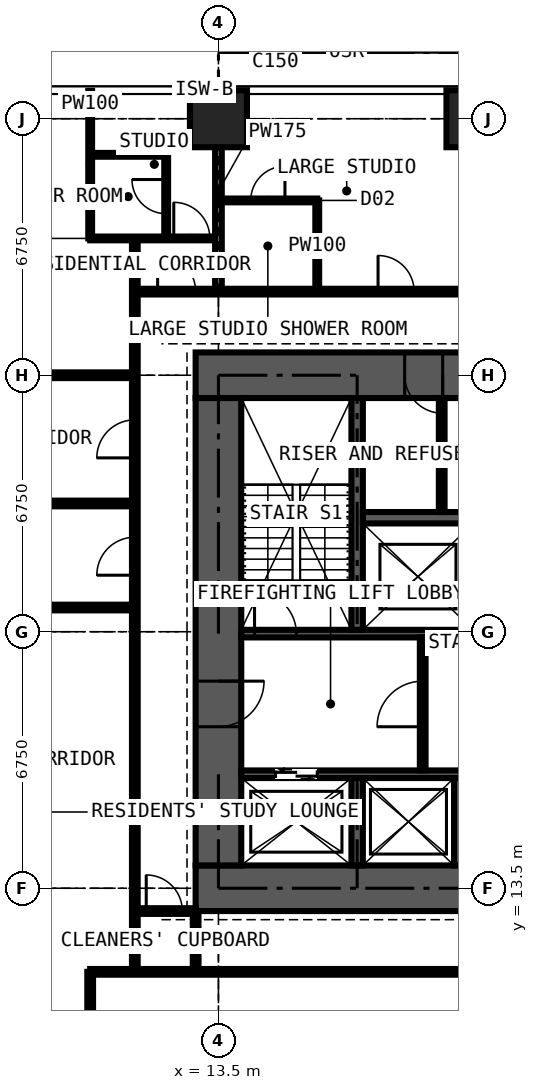
"""IFC4 building model, lengths in metres.
Left out: names, types, materials, properties, quantities, classifications, styles, units other than length and angle.
Written with IfcOpenShell. Run it as: python <this file> out.ifc"""

import sys

from ifc_helpers import new_model, si_unit, direction, frame, frame_2d, origin, origin_2d, place, context, subcontext, project, spatial, rectangle, extrude, element, fill, save


model = new_model("IFC4")
c1 = context("Model", 3, precision=1e-05, world=origin(), true_north=direction((0.0, 1.0)))
c2 = subcontext(c1, "Body", "Model", "MODEL_VIEW")
j1 = project(units=[si_unit("LENGTHUNIT", "METRE"), si_unit("PLANEANGLEUNIT", "RADIAN")], contexts=[c1])
p1 = place(None, origin())
s1 = spatial("IfcSite", under=j1, at=p1, CompositionType="ELEMENT")
p2 = place(p1, origin())
s2 = spatial("IfcBuilding", under=s1, at=p2, CompositionType="ELEMENT")
p3 = place(p2, frame((0.0, 0.0, 126.9)))
s3 = spatial("IfcBuildingStorey", under=s2, at=p3, CompositionType="ELEMENT", Elevation=126.9)
for number, where, z_axis, x_axis in (
    (1, (13.5, 33.75, 0.0), (0.0, 0.0, 1.0), (1.0, 0.0, 0.0)),
    (2, (20.25, 33.75, 0.0), (0.0, 0.0, 1.0), (1.0, 0.0, 0.0)),
):
    element("IfcColumn", number, at=place(p3, frame(where, z_axis=z_axis, x_axis=x_axis)), inside=s3, PredefinedType="COLUMN", context=c2, shape_type="SweptSolid", body=[
        extrude(rectangle(XDim=1.5, YDim=1.5, at=origin_2d()), origin(), (0.0, 0.0, 1.0), 3.6),
    ])
p4 = place(p3, frame((12.9, 13.5, 0.0), z_axis=(0.0, 0.0, 1.0), x_axis=(1.0, 0.0, 0.0)))
e3 = element("IfcWall", 3, at=p4, inside=s3, PredefinedType="SHEAR", context=c2, shape_type="SweptSolid", body=[
    extrude(rectangle(XDim=14.7, YDim=1.2, at=frame_2d((7.35, 0.0))), origin(), (0.0, 0.0, 1.0), 3.6),
])
p5 = place(p3, frame((27.6, 27.0, 0.0), z_axis=(0.0, 0.0, 1.0), x_axis=(-1.0, 0.0, 0.0)))
e4 = element("IfcWall", 4, at=p5, inside=s3, PredefinedType="SHEAR", context=c2, shape_type="SweptSolid", body=[
    extrude(rectangle(XDim=14.7, YDim=1.2, at=frame_2d((7.35, 0.0))), origin(), (0.0, 0.0, 1.0), 3.6),
])
p6 = place(p5, frame((5.225, 0.0, 0.0)))
e5 = element("IfcOpeningElement", 5, at=p6, cuts=e4, PredefinedType="OPENING", context=c2, shape_type="SweptSolid", body=[
    extrude(rectangle(XDim=0.9, YDim=2.2, at=frame_2d((0.45, 1.1))), frame((0.0, 0.61, 0.0), z_axis=(0.0, -1.0, 0.0), x_axis=(1.0, 0.0, 0.0)), (0.0, 0.0, 1.0), 1.22),
])
p7 = place(p5, frame((8.2, 0.0, 0.0)))
e6 = element("IfcOpeningElement", 6, at=p7, cuts=e4, PredefinedType="OPENING", context=c2, shape_type="SweptSolid", body=[
    extrude(rectangle(XDim=1.0, YDim=2.2, at=frame_2d((0.5, 1.1))), frame((0.0, 0.61, 0.0), z_axis=(0.0, -1.0, 0.0), x_axis=(1.0, 0.0, 0.0)), (0.0, 0.0, 1.0), 1.22),
])
p8 = place(p3, frame((13.5, 26.4, 0.0), z_axis=(0.0, 0.0, 1.0), x_axis=(0.0, -1.0, 0.0)))
e7 = element("IfcWall", 7, at=p8, inside=s3, PredefinedType="SHEAR", context=c2, shape_type="SweptSolid", body=[
    extrude(rectangle(XDim=12.3, YDim=1.2, at=frame_2d((6.15, 0.0))), origin(), (0.0, 0.0, 1.0), 3.6),
])
p9 = place(p8, frame((7.45, 0.0, 0.0)))
e8 = element("IfcOpeningElement", 8, at=p9, cuts=e7, PredefinedType="OPENING", context=c2, shape_type="SweptSolid", body=[
    extrude(rectangle(XDim=1.2, YDim=2.2, at=frame_2d((0.6, 1.1))), frame((0.0, 0.61, 0.0), z_axis=(0.0, -1.0, 0.0), x_axis=(1.0, 0.0, 0.0)), (0.0, 0.0, 1.0), 1.22),
])
p10 = place(p3, frame((14.1, 16.5, 0.0), z_axis=(0.0, 0.0, 1.0), x_axis=(1.0, 0.0, 0.0)))
e9 = element("IfcWall", 9, at=p10, inside=s3, PredefinedType="SHEAR", context=c2, shape_type="SweptSolid", body=[
    extrude(rectangle(XDim=12.3, YDim=0.2, at=frame_2d((6.15, 0.0))), origin(), (0.0, 0.0, 1.0), 3.6),
])
p11 = place(p10, frame((0.9, 0.0, 0.0)))
e10 = element("IfcOpeningElement", 10, at=p11, cuts=e9, PredefinedType="OPENING", context=c2, shape_type="SweptSolid", body=[
    extrude(rectangle(XDim=1.1, YDim=2.2, at=frame_2d((0.55, 1.1))), frame((0.0, 0.11, 0.0), z_axis=(0.0, -1.0, 0.0), x_axis=(1.0, 0.0, 0.0)), (0.0, 0.0, 1.0), 0.22),
])
p12 = place(p10, frame((9.5, 0.0, 0.0)))
e11 = element("IfcOpeningElement", 11, at=p12, cuts=e9, PredefinedType="OPENING", context=c2, shape_type="SweptSolid", body=[
    extrude(rectangle(XDim=1.1, YDim=2.2, at=frame_2d((0.55, 1.1))), frame((0.0, 0.11, 0.0), z_axis=(0.0, -1.0, 0.0), x_axis=(1.0, 0.0, 0.0)), (0.0, 0.0, 1.0), 0.22),
])
p13 = place(p3, frame((14.1, 20.2, 0.0), z_axis=(0.0, 0.0, 1.0), x_axis=(1.0, 0.0, 0.0)))
e12 = element("IfcWall", 12, at=p13, inside=s3, PredefinedType="SHEAR", context=c2, shape_type="SweptSolid", body=[
    extrude(rectangle(XDim=12.3, YDim=0.2, at=frame_2d((6.15, 0.0))), origin(), (0.0, 0.0, 1.0), 3.6),
])
p14 = place(p13, frame((0.35, 0.0, 0.0)))
e13 = element("IfcOpeningElement", 13, at=p14, cuts=e12, PredefinedType="OPENING", context=c2, shape_type="SweptSolid", body=[
    extrude(rectangle(XDim=1.1, YDim=2.2, at=frame_2d((0.55, 1.1))), frame((0.0, 0.11, 0.0), z_axis=(0.0, -1.0, 0.0), x_axis=(1.0, 0.0, 0.0)), (0.0, 0.0, 1.0), 0.22),
])
p15 = place(p13, frame((9.75, 0.0, 0.0)))
e14 = element("IfcOpeningElement", 14, at=p15, cuts=e12, PredefinedType="OPENING", context=c2, shape_type="SweptSolid", body=[
    extrude(rectangle(XDim=1.1, YDim=2.2, at=frame_2d((0.55, 1.1))), frame((0.0, 0.11, 0.0), z_axis=(0.0, -1.0, 0.0), x_axis=(1.0, 0.0, 0.0)), (0.0, 0.0, 1.0), 0.22),
])
p16 = place(p3, frame((17.15, 20.3, 0.0), z_axis=(0.0, 0.0, 1.0), x_axis=(0.0, 1.0, 0.0)))
e15 = element("IfcWall", 15, at=p16, inside=s3, PredefinedType="SHEAR", context=c2, shape_type="SweptSolid", body=[
    extrude(rectangle(XDim=6.1, YDim=0.3, at=frame_2d((3.05, 0.0))), origin(), (0.0, 0.0, 1.0), 3.6),
])
p17 = place(p3, frame((17.3, 23.25, 0.0), z_axis=(0.0, 0.0, 1.0), x_axis=(1.0, 0.0, 0.0)))
e16 = element("IfcWall", 16, at=p17, inside=s3, PredefinedType="SHEAR", context=c2, shape_type="SweptSolid", body=[
    extrude(rectangle(XDim=5.9, YDim=0.3, at=frame_2d((2.95, 0.0))), origin(), (0.0, 0.0, 1.0), 3.6),
])
for number, where, z_axis, x_axis in (
    (17, (17.15, 14.1, 0.0), (0.0, 0.0, 1.0), (0.0, 1.0, 0.0)),
    (18, (19.85, 14.1, 0.0), (0.0, 0.0, 1.0), (0.0, 1.0, 0.0)),
):
    element("IfcWall", number, at=place(p3, frame(where, z_axis=z_axis, x_axis=x_axis)), inside=s3, PredefinedType="SHEAR", context=c2, shape_type="SweptSolid", body=[
        extrude(rectangle(XDim=2.3, YDim=0.3, at=frame_2d((1.15, 0.0))), origin(), (0.0, 0.0, 1.0), 3.6),
    ])
p18 = place(p3, frame((18.875, 16.6, 0.0), z_axis=(0.0, 0.0, 1.0), x_axis=(0.0, 1.0, 0.0)))
e19 = element("IfcWall", 19, at=p18, inside=s3, PredefinedType="PARTITIONING", context=c2, shape_type="SweptSolid", body=[
    extrude(rectangle(XDim=3.5, YDim=0.15, at=frame_2d((1.75, 0.0))), origin(), (0.0, 0.0, 1.0), 3.375),
])
p19 = place(p18, frame((1.15, 0.0, 0.0)))
e20 = element("IfcOpeningElement", 20, at=p19, cuts=e19, PredefinedType="OPENING", context=c2, shape_type="SweptSolid", body=[
    extrude(rectangle(XDim=1.2, YDim=2.2, at=frame_2d((0.6, 1.1))), frame((0.0, 0.085, 0.0), z_axis=(0.0, -1.0, 0.0), x_axis=(1.0, 0.0, 0.0)), (0.0, 0.0, 1.0), 0.17),
])
p20 = place(p3, frame((19.375, 23.4, 0.0), z_axis=(0.0, 0.0, 1.0), x_axis=(0.0, 1.0, 0.0)))
e21 = element("IfcWall", 21, at=p20, inside=s3, PredefinedType="PARTITIONING", context=c2, shape_type="SweptSolid", body=[
    extrude(rectangle(XDim=3.0, YDim=0.15, at=frame_2d((1.5, 0.0))), origin(), (0.0, 0.0, 1.0), 3.375),
])
p21 = place(p3, frame((-0.734, 23.625, 0.0), z_axis=(0.0, 0.0, 1.0), x_axis=(1.0, 0.0, 0.0)))
e22 = element("IfcWall", 22, at=p21, inside=s3, PredefinedType="PARTITIONING", context=c2, shape_type="SweptSolid", body=[
    extrude(rectangle(XDim=12.034, YDim=0.15, at=frame_2d((6.017, 0.0))), origin(), (0.0, 0.0, 1.0), 3.375),
])
p22 = place(p3, frame((-0.734, 27.0, 0.0), z_axis=(0.0, 0.0, 1.0), x_axis=(1.0, 0.0, 0.0)))
e23 = element("IfcWall", 23, at=p22, inside=s3, PredefinedType="PARTITIONING", context=c2, shape_type="SweptSolid", body=[
    extrude(rectangle(XDim=12.034, YDim=0.15, at=frame_2d((6.017, 0.0))), origin(), (0.0, 0.0, 1.0), 2.806),
])
p23 = place(p22, frame((8.234, 0.0, 0.0)))
e24 = element("IfcOpeningElement", 24, at=p23, cuts=e23, PredefinedType="OPENING", context=c2, shape_type="SweptSolid", body=[
    extrude(rectangle(XDim=1.0, YDim=2.2, at=frame_2d((0.5, 1.1))), frame((0.0, 0.085, 0.0), z_axis=(0.0, -1.0, 0.0), x_axis=(1.0, 0.0, 0.0)), (0.0, 0.0, 1.0), 0.17),
])
p24 = place(p3, frame((5.65, 20.887, 0.0), z_axis=(0.0, 0.0, 1.0), x_axis=(1.0, 0.0, 0.0)))
e25 = element("IfcWall", 25, at=p24, inside=s3, PredefinedType="PARTITIONING", context=c2, shape_type="SweptSolid", body=[
    extrude(rectangle(XDim=5.65, YDim=0.15, at=frame_2d((2.825, 0.0))), origin(), (0.0, 0.0, 1.0), 3.375),
])
p25 = place(p3, frame((10.125, 10.125, 0.0), z_axis=(0.0, 0.0, 1.0), x_axis=(0.0, 1.0, 0.0)))
e26 = element("IfcWall", 26, at=p25, inside=s3, PredefinedType="PARTITIONING", context=c2, shape_type="SweptSolid", body=[
    extrude(rectangle(XDim=1.175, YDim=0.15, at=frame_2d((0.587, 0.0))), origin(), (0.0, 0.0, 1.0), 3.375),
])
p26 = place(p3, frame((10.125, 11.3, 0.0), z_axis=(0.0, 0.0, 1.0), x_axis=(1.0, 0.0, 0.0)))
e27 = element("IfcWall", 27, at=p26, inside=s3, PredefinedType="PARTITIONING", context=c2, shape_type="SweptSolid", body=[
    extrude(rectangle(XDim=20.675, YDim=0.15, at=frame_2d((10.337, 0.0))), origin(), (0.0, 0.0, 1.0), 3.375),
])
p27 = place(p26, frame((11.312, 0.0, 0.0)))
e28 = element("IfcOpeningElement", 28, at=p27, cuts=e27, PredefinedType="OPENING", context=c2, shape_type="SweptSolid", body=[
    extrude(rectangle(XDim=1.0, YDim=2.2, at=frame_2d((0.5, 1.1))), frame((0.0, 0.085, 0.0), z_axis=(0.0, -1.0, 0.0), x_axis=(1.0, 0.0, 0.0)), (0.0, 0.0, 1.0), 0.17),
])
p28 = place(p3, frame((10.125, 30.6, 0.0), z_axis=(0.0, 0.0, 1.0), x_axis=(0.0, 1.0, 0.0)))
e29 = element("IfcWall", 29, at=p28, inside=s3, PredefinedType="PARTITIONING", context=c2, shape_type="SweptSolid", body=[
    extrude(rectangle(XDim=3.884, YDim=0.1, at=frame_2d((1.942, 0.0))), origin(), (0.0, 0.0, 1.0), 3.375),
])
p29 = place(p3, frame((10.125, 30.6, 0.0), z_axis=(0.0, 0.0, 1.0), x_axis=(1.0, 0.0, 0.0)))
e30 = element("IfcWall", 30, at=p29, inside=s3, PredefinedType="PARTITIONING", context=c2, shape_type="SweptSolid", body=[
    extrude(rectangle(XDim=3.375, YDim=0.1, at=frame_2d((1.688, 0.0))), origin(), (0.0, 0.0, 1.0), 3.375),
])
p30 = place(p29, frame((2.2, 0.0, 0.0)))
e31 = element("IfcOpeningElement", 31, at=p30, cuts=e30, PredefinedType="OPENING", context=c2, shape_type="SweptSolid", body=[
    extrude(rectangle(XDim=0.95, YDim=2.2, at=frame_2d((0.475, 1.1))), frame((0.0, 0.06, 0.0), z_axis=(0.0, -1.0, 0.0), x_axis=(1.0, 0.0, 0.0)), (0.0, 0.0, 1.0), 0.12),
])
p31 = place(p3, frame((10.125, 32.8, 0.0), z_axis=(0.0, 0.0, 1.0), x_axis=(1.0, 0.0, 0.0)))
e32 = element("IfcWall", 32, at=p31, inside=s3, PredefinedType="PARTITIONING", context=c2, shape_type="SweptSolid", body=[
    extrude(rectangle(XDim=2.0, YDim=0.1, at=frame_2d((1.0, 0.0))), origin(), (0.0, 0.0, 1.0), 3.375),
])
p32 = place(p3, frame((11.3, 11.3, 0.0), z_axis=(0.0, 0.0, 1.0), x_axis=(0.0, 1.0, 0.0)))
e33 = element("IfcWall", 33, at=p32, inside=s3, PredefinedType="PARTITIONING", context=c2, shape_type="SweptSolid", body=[
    extrude(rectangle(XDim=19.3, YDim=0.15, at=frame_2d((9.65, 0.0))), origin(), (0.0, 0.0, 1.0), 3.375),
])
p33 = place(p32, frame((13.525, 0.0, 0.0)))
e34 = element("IfcOpeningElement", 34, at=p33, cuts=e33, PredefinedType="OPENING", context=c2, shape_type="SweptSolid", body=[
    extrude(rectangle(XDim=1.0, YDim=2.2, at=frame_2d((0.5, 1.1))), frame((0.0, 0.085, 0.0), z_axis=(0.0, -1.0, 0.0), x_axis=(1.0, 0.0, 0.0)), (0.0, 0.0, 1.0), 0.17),
])
p34 = place(p32, frame((10.438, 0.0, 0.0)))
e35 = element("IfcOpeningElement", 35, at=p34, cuts=e33, PredefinedType="OPENING", context=c2, shape_type="SweptSolid", body=[
    extrude(rectangle(XDim=1.0, YDim=2.2, at=frame_2d((0.5, 1.1))), frame((0.0, 0.085, 0.0), z_axis=(0.0, -1.0, 0.0), x_axis=(1.0, 0.0, 0.0)), (0.0, 0.0, 1.0), 0.17),
])
p35 = place(p3, frame((11.3, 12.9, 0.0), z_axis=(0.0, 0.0, 1.0), x_axis=(1.0, 0.0, 0.0)))
e36 = element("IfcWall", 36, at=p35, inside=s3, PredefinedType="PARTITIONING", context=c2, shape_type="SweptSolid", body=[
    extrude(rectangle(XDim=1.6, YDim=0.15, at=frame_2d((0.8, 0.0))), origin(), (0.0, 0.0, 1.0), 2.806),
])
p36 = place(p35, frame((0.3, 0.0, 0.0)))
e37 = element("IfcOpeningElement", 37, at=p36, cuts=e36, PredefinedType="OPENING", context=c2, shape_type="SweptSolid", body=[
    extrude(rectangle(XDim=0.95, YDim=2.2, at=frame_2d((0.475, 1.1))), frame((0.0, 0.085, 0.0), z_axis=(0.0, -1.0, 0.0), x_axis=(1.0, 0.0, 0.0)), (0.0, 0.0, 1.0), 0.17),
])
p37 = place(p3, frame((11.3, 29.2, 0.0), z_axis=(0.0, 0.0, 1.0), x_axis=(1.0, 0.0, 0.0)))
e38 = element("IfcWall", 38, at=p37, inside=s3, PredefinedType="PARTITIONING", context=c2, shape_type="SweptSolid", body=[
    extrude(rectangle(XDim=19.075, YDim=0.15, at=frame_2d((9.538, 0.0))), origin(), (0.0, 0.0, 1.0), 3.375),
])
p38 = place(p37, frame((6.4, 0.0, 0.0)))
e39 = element("IfcOpeningElement", 39, at=p38, cuts=e38, PredefinedType="OPENING", context=c2, shape_type="SweptSolid", body=[
    extrude(rectangle(XDim=0.95, YDim=2.2, at=frame_2d((0.475, 1.1))), frame((0.0, 0.085, 0.0), z_axis=(0.0, -1.0, 0.0), x_axis=(1.0, 0.0, 0.0)), (0.0, 0.0, 1.0), 0.17),
])
p39 = place(p37, frame((9.2, 0.0, 0.0)))
e40 = element("IfcOpeningElement", 40, at=p39, cuts=e38, PredefinedType="OPENING", context=c2, shape_type="SweptSolid", body=[
    extrude(rectangle(XDim=0.95, YDim=2.2, at=frame_2d((0.475, 1.1))), frame((0.0, 0.085, 0.0), z_axis=(0.0, -1.0, 0.0), x_axis=(1.0, 0.0, 0.0)), (0.0, 0.0, 1.0), 0.17),
])
p40 = place(p37, frame((0.6, 0.0, 0.0)))
e41 = element("IfcOpeningElement", 41, at=p40, cuts=e38, PredefinedType="OPENING", context=c2, shape_type="SweptSolid", body=[
    extrude(rectangle(XDim=1.0, YDim=2.2, at=frame_2d((0.5, 1.1))), frame((0.0, 0.085, 0.0), z_axis=(0.0, -1.0, 0.0), x_axis=(1.0, 0.0, 0.0)), (0.0, 0.0, 1.0), 0.17),
])
p41 = place(p3, frame((12.125, 30.6, 0.0), z_axis=(0.0, 0.0, 1.0), x_axis=(0.0, 1.0, 0.0)))
e42 = element("IfcWall", 42, at=p41, inside=s3, PredefinedType="PARTITIONING", context=c2, shape_type="SweptSolid", body=[
    extrude(rectangle(XDim=2.2, YDim=0.1, at=frame_2d((1.1, 0.0))), origin(), (0.0, 0.0, 1.0), 3.375),
])
p42 = place(p41, frame((0.65, 0.0, 0.0)))
e43 = element("IfcOpeningElement", 43, at=p42, cuts=e42, PredefinedType="OPENING", context=c2, shape_type="SweptSolid", body=[
    extrude(rectangle(XDim=0.9, YDim=2.2, at=frame_2d((0.45, 1.1))), frame((0.0, 0.06, 0.0), z_axis=(0.0, -1.0, 0.0), x_axis=(1.0, 0.0, 0.0)), (0.0, 0.0, 1.0), 0.12),
])
p43 = place(p3, frame((12.9, 11.3, 0.0), z_axis=(0.0, 0.0, 1.0), x_axis=(0.0, 1.0, 0.0)))
e44 = element("IfcWall", 44, at=p43, inside=s3, PredefinedType="PARTITIONING", context=c2, shape_type="SweptSolid", body=[
    extrude(rectangle(XDim=1.6, YDim=0.15, at=frame_2d((0.8, 0.0))), origin(), (0.0, 0.0, 1.0), 3.375),
])
p44 = place(p3, frame((13.5, 29.2, 0.0), z_axis=(0.0, 0.0, 1.0), x_axis=(0.0, 1.0, 0.0)))
e45 = element("IfcWall", 45, at=p44, inside=s3, PredefinedType="PARTITIONING", context=c2, shape_type="SweptSolid", body=[
    extrude(rectangle(XDim=5.284, YDim=0.175, at=frame_2d((2.642, 0.0))), origin(), (0.0, 0.0, 1.0), 2.61),
])
p45 = place(p3, frame((13.5, 31.6, 0.0), z_axis=(0.0, 0.0, 1.0), x_axis=(1.0, 0.0, 0.0)))
e46 = element("IfcWall", 46, at=p45, inside=s3, PredefinedType="PARTITIONING", context=c2, shape_type="SweptSolid", body=[
    extrude(rectangle(XDim=2.6, YDim=0.1, at=frame_2d((1.3, 0.0))), origin(), (0.0, 0.0, 1.0), 3.375),
])
p46 = place(p45, frame((0.85, 0.0, 0.0)))
e47 = element("IfcOpeningElement", 47, at=p46, cuts=e46, PredefinedType="OPENING", context=c2, shape_type="SweptSolid", body=[
    extrude(rectangle(XDim=0.9, YDim=2.2, at=frame_2d((0.45, 1.1))), frame((0.0, 0.06, 0.0), z_axis=(0.0, -1.0, 0.0), x_axis=(1.0, 0.0, 0.0)), (0.0, 0.0, 1.0), 0.12),
])
p47 = place(p3, frame((16.1, 29.2, 0.0), z_axis=(0.0, 0.0, 1.0), x_axis=(0.0, 1.0, 0.0)))
e48 = element("IfcWall", 48, at=p47, inside=s3, PredefinedType="PARTITIONING", context=c2, shape_type="SweptSolid", body=[
    extrude(rectangle(XDim=2.4, YDim=0.1, at=frame_2d((1.2, 0.0))), origin(), (0.0, 0.0, 1.0), 3.375),
])
p48 = place(p11, origin())
e49 = element("IfcDoor", 49, at=p48, inside=s3, OperationType="DOUBLE_DOOR_SLIDING", PredefinedType="DOOR", context=c2, shape_type="SweptSolid", body=[
    extrude(rectangle(XDim=1.1, YDim=2.2, at=frame_2d((0.55, 1.1))), frame((0.0, 0.025, 0.0), z_axis=(0.0, -1.0, 0.0), x_axis=(1.0, 0.0, 0.0)), (0.0, 0.0, 1.0), 0.05),
])
fill(e10, e49)
p49 = place(p9, origin())
e50 = element("IfcDoor", 50, at=p49, inside=s3, OperationType="DOUBLE_DOOR_SINGLE_SWING", PredefinedType="DOOR", context=c2, shape_type="SweptSolid", body=[
    extrude(rectangle(XDim=1.2, YDim=2.2, at=frame_2d((0.6, 1.1))), frame((0.0, 0.025, 0.0), z_axis=(0.0, -1.0, 0.0), x_axis=(1.0, 0.0, 0.0)), (0.0, 0.0, 1.0), 0.05),
])
fill(e8, e50)
p50 = place(p19, origin())
e51 = element("IfcDoor", 51, at=p50, inside=s3, OperationType="DOUBLE_DOOR_SINGLE_SWING", PredefinedType="DOOR", context=c2, shape_type="SweptSolid", body=[
    extrude(rectangle(XDim=1.2, YDim=2.2, at=frame_2d((0.6, 1.1))), frame((0.0, 0.025, 0.0), z_axis=(0.0, -1.0, 0.0), x_axis=(1.0, 0.0, 0.0)), (0.0, 0.0, 1.0), 0.05),
])
fill(e20, e51)
p51 = place(p7, origin())
e52 = element("IfcDoor", 52, at=p51, inside=s3, OperationType="SINGLE_SWING_LEFT", PredefinedType="DOOR", context=c2, shape_type="SweptSolid", body=[
    extrude(rectangle(XDim=1.0, YDim=2.2, at=frame_2d((0.5, 1.1))), frame((0.0, 0.025, 0.0), z_axis=(0.0, -1.0, 0.0), x_axis=(1.0, 0.0, 0.0)), (0.0, 0.0, 1.0), 0.05),
])
fill(e6, e52)
p52 = place(p14, origin())
e53 = element("IfcDoor", 53, at=p52, inside=s3, OperationType="SINGLE_SWING_LEFT", PredefinedType="DOOR", context=c2, shape_type="SweptSolid", body=[
    extrude(rectangle(XDim=1.1, YDim=2.2, at=frame_2d((0.55, 1.1))), frame((0.0, 0.025, 0.0), z_axis=(0.0, -1.0, 0.0), x_axis=(1.0, 0.0, 0.0)), (0.0, 0.0, 1.0), 0.05),
])
fill(e13, e53)
p53 = place(p36, origin())
e54 = element("IfcDoor", 54, at=p53, inside=s3, OperationType="SINGLE_SWING_LEFT", PredefinedType="DOOR", context=c2, shape_type="SweptSolid", body=[
    extrude(rectangle(XDim=0.95, YDim=2.2, at=frame_2d((0.475, 1.1))), frame((0.0, 0.025, 0.0), z_axis=(0.0, -1.0, 0.0), x_axis=(1.0, 0.0, 0.0)), (0.0, 0.0, 1.0), 0.05),
])
fill(e37, e54)
p54 = place(p38, origin())
e55 = element("IfcDoor", 55, at=p54, inside=s3, OperationType="SINGLE_SWING_LEFT", PredefinedType="DOOR", context=c2, shape_type="SweptSolid", body=[
    extrude(rectangle(XDim=0.95, YDim=2.2, at=frame_2d((0.475, 1.1))), frame((0.0, 0.025, 0.0), z_axis=(0.0, -1.0, 0.0), x_axis=(1.0, 0.0, 0.0)), (0.0, 0.0, 1.0), 0.05),
])
fill(e39, e55)
p55 = place(p46, origin())
e56 = element("IfcDoor", 56, at=p55, inside=s3, OperationType="SINGLE_SWING_RIGHT", PredefinedType="DOOR", context=c2, shape_type="SweptSolid", body=[
    extrude(rectangle(XDim=0.9, YDim=2.2, at=frame_2d((0.45, 1.1))), frame((0.0, 0.025, 0.0), z_axis=(0.0, -1.0, 0.0), x_axis=(1.0, 0.0, 0.0)), (0.0, 0.0, 1.0), 0.05),
])
fill(e47, e56)
p56 = place(p30, origin())
e57 = element("IfcDoor", 57, at=p56, inside=s3, OperationType="SINGLE_SWING_LEFT", PredefinedType="DOOR", context=c2, shape_type="SweptSolid", body=[
    extrude(rectangle(XDim=0.95, YDim=2.2, at=frame_2d((0.475, 1.1))), frame((0.0, 0.025, 0.0), z_axis=(0.0, -1.0, 0.0), x_axis=(1.0, 0.0, 0.0)), (0.0, 0.0, 1.0), 0.05),
])
fill(e31, e57)
p57 = place(p42, origin())
e58 = element("IfcDoor", 58, at=p57, inside=s3, OperationType="SINGLE_SWING_RIGHT", PredefinedType="DOOR", context=c2, shape_type="SweptSolid", body=[
    extrude(rectangle(XDim=0.9, YDim=2.2, at=frame_2d((0.45, 1.1))), frame((0.0, 0.025, 0.0), z_axis=(0.0, -1.0, 0.0), x_axis=(1.0, 0.0, 0.0)), (0.0, 0.0, 1.0), 0.05),
])
fill(e43, e58)
p58 = place(p40, origin())
e59 = element("IfcDoor", 59, at=p58, inside=s3, OperationType="SINGLE_SWING_LEFT", PredefinedType="DOOR", context=c2, shape_type="SweptSolid", body=[
    extrude(rectangle(XDim=1.0, YDim=2.2, at=frame_2d((0.5, 1.1))), frame((0.0, 0.025, 0.0), z_axis=(0.0, -1.0, 0.0), x_axis=(1.0, 0.0, 0.0)), (0.0, 0.0, 1.0), 0.05),
])
fill(e41, e59)
p59 = place(p33, origin())
e60 = element("IfcDoor", 60, at=p59, inside=s3, OperationType="SINGLE_SWING_LEFT", PredefinedType="DOOR", context=c2, shape_type="SweptSolid", body=[
    extrude(rectangle(XDim=1.0, YDim=2.2, at=frame_2d((0.5, 1.1))), frame((0.0, 0.025, 0.0), z_axis=(0.0, -1.0, 0.0), x_axis=(1.0, 0.0, 0.0)), (0.0, 0.0, 1.0), 0.05),
])
fill(e34, e60)
p60 = place(p34, origin())
e61 = element("IfcDoor", 61, at=p60, inside=s3, OperationType="SINGLE_SWING_LEFT", PredefinedType="DOOR", context=c2, shape_type="SweptSolid", body=[
    extrude(rectangle(XDim=1.0, YDim=2.2, at=frame_2d((0.5, 1.1))), frame((0.0, 0.025, 0.0), z_axis=(0.0, -1.0, 0.0), x_axis=(1.0, 0.0, 0.0)), (0.0, 0.0, 1.0), 0.05),
])
fill(e35, e61)
save(model, sys.argv[1])
